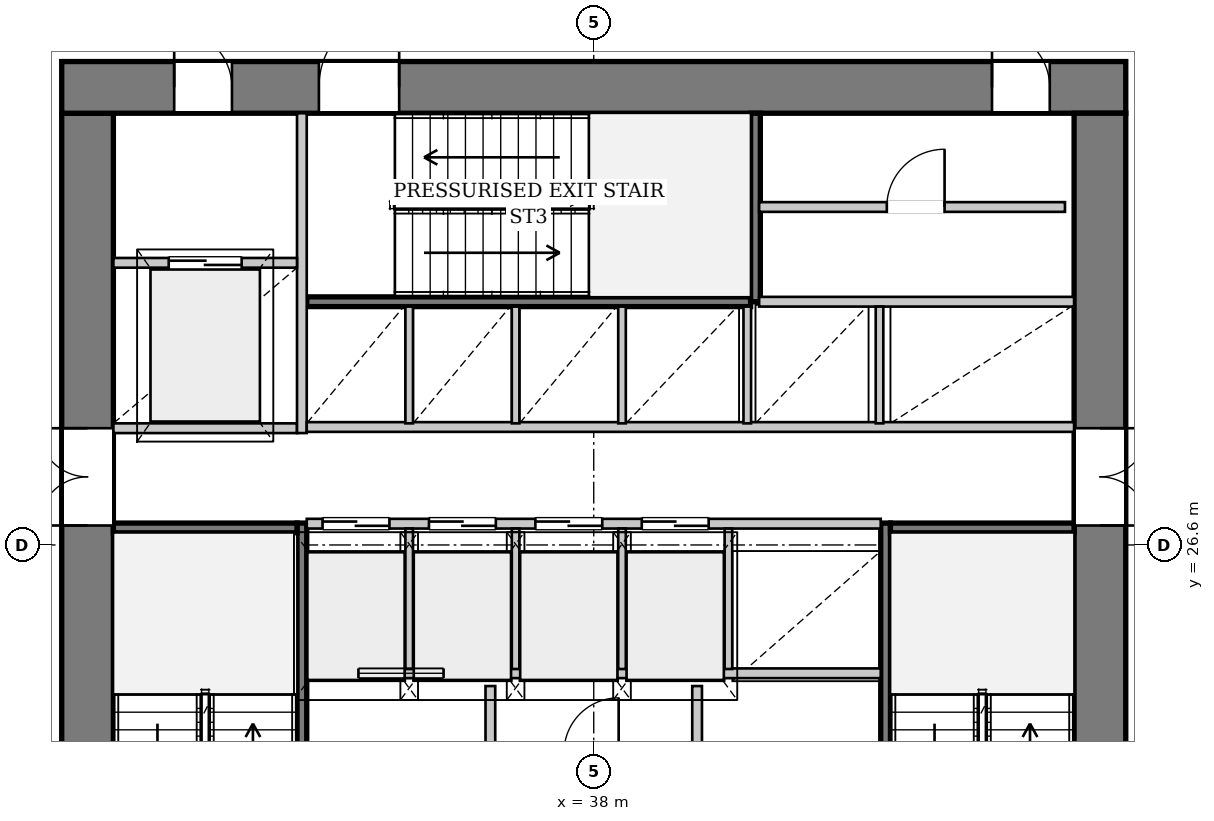
"""IFC4 building model, lengths in metres.
Left out: names, types, materials, properties, quantities, classifications, styles, units other than length and angle.
Written with IfcOpenShell. Run it as: python <this file> out.ifc"""

import sys

from ifc_helpers import new_model, si_unit, direction, frame, frame_2d, origin, place, context, subcontext, project, spatial, rectangle, extrude, source, transform, mapped, element, fill, save


model = new_model("IFC4")
c1 = context("Model", 3, precision=1e-05, world=origin(), true_north=direction((0.0, 1.0)))
c2 = subcontext(c1, "Body", "Model", "MODEL_VIEW")
j1 = project(units=[si_unit("LENGTHUNIT", "METRE"), si_unit("PLANEANGLEUNIT", "RADIAN")], contexts=[c1])
p1 = place(None, origin())
s1 = spatial("IfcSite", under=j1, at=p1, CompositionType="ELEMENT")
p2 = place(p1, origin())
s2 = spatial("IfcBuilding", under=s1, at=p2, CompositionType="ELEMENT")
p3 = place(p2, frame((0.0, 0.0, 71.9)))
s3 = spatial("IfcBuildingStorey", under=s2, at=p3, CompositionType="ELEMENT", Elevation=71.9)
p4 = place(p3, frame((46.163, 43.595, 0.0), z_axis=(0.0, 0.0, 1.0), x_axis=(0.906302989161, -0.422628550667, 0.0)))
e1 = element("IfcWall", 1, at=p4, inside=s3, PredefinedType="SOLIDWALL", context=c2, shape_type="SweptSolid", body=[
    extrude(rectangle(XDim=23.672, YDim=0.38, at=frame_2d((11.836, 0.0))), origin(), (0.0, 0.0, 1.0), 3.042),
])
p5 = place(p4, frame((5.528, 0.0, 0.65)))
e2 = element("IfcOpeningElement", 2, at=p5, cuts=e1, PredefinedType="OPENING", context=c2, shape_type="SweptSolid", body=[
    extrude(rectangle(XDim=2.2, YDim=2.25, at=frame_2d((1.1, 1.125))), frame((0.0, 0.2, 0.0), z_axis=(0.0, -1.0, 0.0), x_axis=(1.0, 0.0, 0.0)), (0.0, 0.0, 1.0), 0.4),
])
p6 = place(p4, frame((15.944, 0.0, 0.65)))
e3 = element("IfcOpeningElement", 3, at=p6, cuts=e1, PredefinedType="OPENING", context=c2, shape_type="SweptSolid", body=[
    extrude(rectangle(XDim=2.2, YDim=2.25, at=frame_2d((1.1, 1.125))), frame((0.0, 0.2, 0.0), z_axis=(0.0, -1.0, 0.0), x_axis=(1.0, 0.0, 0.0)), (0.0, 0.0, 1.0), 0.4),
])
p7 = place(p3, frame((29.675, 19.5, 0.0), z_axis=(0.0, 0.0, 1.0), x_axis=(0.0, 1.0, 0.0)))
e4 = element("IfcWall", 4, at=p7, inside=s3, PredefinedType="SHEAR", context=c2, shape_type="SweptSolid", body=[
    extrude(rectangle(XDim=14.2, YDim=0.85, at=frame_2d((7.1, 0.0))), origin(), (0.0, 0.0, 1.0), 3.75),
])
p8 = place(p7, frame((7.42, 0.0, 0.0)))
e5 = element("IfcOpeningElement", 5, at=p8, cuts=e4, PredefinedType="OPENING", context=c2, shape_type="SweptSolid", body=[
    extrude(rectangle(XDim=1.6, YDim=2.2, at=frame_2d((0.8, 1.1))), frame((0.0, 0.435, 0.0), z_axis=(0.0, -1.0, 0.0), x_axis=(1.0, 0.0, 0.0)), (0.0, 0.0, 1.0), 0.87),
])
p9 = place(p3, frame((29.25, 34.125, 0.0), z_axis=(0.0, 0.0, 1.0), x_axis=(1.0, 0.0, 0.0)))
e6 = element("IfcWall", 6, at=p9, inside=s3, PredefinedType="SHEAR", context=c2, shape_type="SweptSolid", body=[
    extrude(rectangle(XDim=17.5, YDim=0.85, at=frame_2d((8.75, 0.0))), origin(), (0.0, 0.0, 1.0), 3.75),
])
p10 = place(p9, frame((1.85, 0.0, 0.0)))
e7 = element("IfcOpeningElement", 7, at=p10, cuts=e6, PredefinedType="OPENING", context=c2, shape_type="SweptSolid", body=[
    extrude(rectangle(XDim=0.95, YDim=2.1, at=frame_2d((0.475, 1.05))), frame((0.0, 0.435, 0.0), z_axis=(0.0, -1.0, 0.0), x_axis=(1.0, 0.0, 0.0)), (0.0, 0.0, 1.0), 0.87),
])
p11 = place(p9, frame((4.23, 0.0, 0.0)))
e8 = element("IfcOpeningElement", 8, at=p11, cuts=e6, PredefinedType="OPENING", context=c2, shape_type="SweptSolid", body=[
    extrude(rectangle(XDim=1.32, YDim=2.2, at=frame_2d((0.66, 1.1))), frame((0.0, 0.435, 0.0), z_axis=(0.0, -1.0, 0.0), x_axis=(1.0, 0.0, 0.0)), (0.0, 0.0, 1.0), 0.87),
])
p12 = place(p9, frame((15.3, 0.0, 0.0)))
e9 = element("IfcOpeningElement", 9, at=p12, cuts=e6, PredefinedType="OPENING", context=c2, shape_type="SweptSolid", body=[
    extrude(rectangle(XDim=0.95, YDim=2.1, at=frame_2d((0.475, 1.05))), frame((0.0, 0.435, 0.0), z_axis=(0.0, -1.0, 0.0), x_axis=(1.0, 0.0, 0.0)), (0.0, 0.0, 1.0), 0.87),
])
p13 = place(p3, frame((46.325, 33.7, 0.0), z_axis=(0.0, 0.0, 1.0), x_axis=(0.0, -1.0, 0.0)))
e10 = element("IfcWall", 10, at=p13, inside=s3, PredefinedType="SHEAR", context=c2, shape_type="SweptSolid", body=[
    extrude(rectangle(XDim=14.2, YDim=0.85, at=frame_2d((7.1, 0.0))), origin(), (0.0, 0.0, 1.0), 3.75),
])
p14 = place(p13, frame((5.18, 0.0, 0.0)))
e11 = element("IfcOpeningElement", 11, at=p14, cuts=e10, PredefinedType="OPENING", context=c2, shape_type="SweptSolid", body=[
    extrude(rectangle(XDim=1.6, YDim=2.2, at=frame_2d((0.8, 1.1))), frame((0.0, 0.435, 0.0), z_axis=(0.0, -1.0, 0.0), x_axis=(1.0, 0.0, 0.0)), (0.0, 0.0, 1.0), 0.87),
])
p15 = place(p3, frame((33.2, 19.5, 0.0), z_axis=(0.0, 0.0, 1.0), x_axis=(0.0, 1.0, 0.0)))
e12 = element("IfcWall", 12, at=p15, inside=s3, PredefinedType="PARTITIONING", context=c2, shape_type="SweptSolid", body=[
    extrude(rectangle(XDim=7.46, YDim=0.16, at=frame_2d((3.73, 0.0))), origin(), (0.0, 0.0, 1.0), 3.75),
])
p16 = place(p15, frame((0.08, 0.0, 0.0)))
e13 = element("IfcOpeningElement", 13, at=p16, cuts=e12, PredefinedType="OPENING", context=c2, shape_type="SweptSolid", body=[
    extrude(rectangle(XDim=1.32, YDim=2.2, at=frame_2d((0.66, 1.1))), frame((0.0, 0.09, 0.0), z_axis=(0.0, -1.0, 0.0), x_axis=(1.0, 0.0, 0.0)), (0.0, 0.0, 1.0), 0.18),
])
p17 = place(p3, frame((30.1, 26.88, 0.0), z_axis=(0.0, 0.0, 1.0), x_axis=(1.0, 0.0, 0.0)))
e14 = element("IfcWall", 14, at=p17, inside=s3, PredefinedType="PARTITIONING", context=c2, shape_type="SweptSolid", body=[
    extrude(rectangle(XDim=3.02, YDim=0.16, at=frame_2d((1.51, 0.0))), origin(), (0.0, 0.0, 1.0), 3.75),
])
p18 = place(p3, frame((42.8, 26.96, 0.0), z_axis=(0.0, 0.0, 1.0), x_axis=(0.0, -1.0, 0.0)))
e15 = element("IfcWall", 15, at=p18, inside=s3, PredefinedType="PARTITIONING", context=c2, shape_type="SweptSolid", body=[
    extrude(rectangle(XDim=7.46, YDim=0.16, at=frame_2d((3.73, 0.0))), origin(), (0.0, 0.0, 1.0), 3.75),
])
p19 = place(p18, frame((6.06, 0.0, 0.0)))
e16 = element("IfcOpeningElement", 16, at=p19, cuts=e15, PredefinedType="OPENING", context=c2, shape_type="SweptSolid", body=[
    extrude(rectangle(XDim=1.32, YDim=2.2, at=frame_2d((0.66, 1.1))), frame((0.0, 0.09, 0.0), z_axis=(0.0, -1.0, 0.0), x_axis=(1.0, 0.0, 0.0)), (0.0, 0.0, 1.0), 0.18),
])
p20 = place(p3, frame((42.88, 26.88, 0.0), z_axis=(0.0, 0.0, 1.0), x_axis=(1.0, 0.0, 0.0)))
e17 = element("IfcWall", 17, at=p20, inside=s3, PredefinedType="PARTITIONING", context=c2, shape_type="SweptSolid", body=[
    extrude(rectangle(XDim=3.02, YDim=0.16, at=frame_2d((1.51, 0.0))), origin(), (0.0, 0.0, 1.0), 3.75),
])
p21 = place(p3, frame((33.28, 30.6, 0.0), z_axis=(0.0, 0.0, 1.0), x_axis=(1.0, 0.0, 0.0)))
e18 = element("IfcWall", 18, at=p21, inside=s3, PredefinedType="PARTITIONING", context=c2, shape_type="SweptSolid", body=[
    extrude(rectangle(XDim=7.3, YDim=0.16, at=frame_2d((3.65, 0.0))), origin(), (0.0, 0.0, 1.0), 3.75),
])
p22 = place(p3, frame((40.66, 30.6, 0.0), z_axis=(0.0, 0.0, 1.0), x_axis=(0.0, 1.0, 0.0)))
e19 = element("IfcWall", 19, at=p22, inside=s3, PredefinedType="PARTITIONING", context=c2, shape_type="SweptSolid", body=[
    extrude(rectangle(XDim=3.1, YDim=0.16, at=frame_2d((1.55, 0.0))), origin(), (0.0, 0.0, 1.0), 3.75),
])
p23 = place(p3, frame((36.3, 19.5, 0.0), z_axis=(0.0, 0.0, 1.0), x_axis=(0.0, 1.0, 0.0)))
e20 = element("IfcWall", 20, at=p23, inside=s3, PredefinedType="PARTITIONING", context=c2, shape_type="SweptSolid", body=[
    extrude(rectangle(XDim=4.78, YDim=0.16, at=frame_2d((2.39, 0.0))), origin(), (0.0, 0.0, 1.0), 3.75),
])
p24 = place(p23, frame((0.6, 0.0, 0.0)))
e21 = element("IfcOpeningElement", 21, at=p24, cuts=e20, PredefinedType="OPENING", context=c2, shape_type="SweptSolid", body=[
    extrude(rectangle(XDim=1.2, YDim=2.2, at=frame_2d((0.6, 1.1))), frame((0.0, 0.09, 0.0), z_axis=(0.0, -1.0, 0.0), x_axis=(1.0, 0.0, 0.0)), (0.0, 0.0, 1.0), 0.18),
])
p25 = place(p23, frame((2.65, 0.0, 0.0)))
e22 = element("IfcOpeningElement", 22, at=p25, cuts=e20, PredefinedType="OPENING", context=c2, shape_type="SweptSolid", body=[
    extrude(rectangle(XDim=0.95, YDim=2.1, at=frame_2d((0.475, 1.05))), frame((0.0, 0.09, 0.0), z_axis=(0.0, -1.0, 0.0), x_axis=(1.0, 0.0, 0.0)), (0.0, 0.0, 1.0), 0.18),
])
p26 = place(p3, frame((39.7, 24.28, 0.0), z_axis=(0.0, 0.0, 1.0), x_axis=(0.0, -1.0, 0.0)))
e23 = element("IfcWall", 23, at=p26, inside=s3, PredefinedType="PARTITIONING", context=c2, shape_type="SweptSolid", body=[
    extrude(rectangle(XDim=4.78, YDim=0.16, at=frame_2d((2.39, 0.0))), origin(), (0.0, 0.0, 1.0), 3.75),
])
p27 = place(p26, frame((3.12, 0.0, 0.0)))
e24 = element("IfcOpeningElement", 24, at=p27, cuts=e23, PredefinedType="OPENING", context=c2, shape_type="SweptSolid", body=[
    extrude(rectangle(XDim=1.2, YDim=2.2, at=frame_2d((0.6, 1.1))), frame((0.0, 0.09, 0.0), z_axis=(0.0, -1.0, 0.0), x_axis=(1.0, 0.0, 0.0)), (0.0, 0.0, 1.0), 0.18),
])
p28 = place(p3, frame((33.28, 24.49, 0.0), z_axis=(0.0, 0.0, 1.0), x_axis=(1.0, 0.0, 0.0)))
e25 = element("IfcWall", 25, at=p28, inside=s3, PredefinedType="PARTITIONING", context=c2, shape_type="SweptSolid", body=[
    extrude(rectangle(XDim=9.44, YDim=0.16, at=frame_2d((4.72, 0.0))), origin(), (0.0, 0.0, 1.0), 3.75),
])
p29 = place(p28, frame((0.85, 0.0, 0.95)))
e26 = element("IfcOpeningElement", 26, at=p29, cuts=e25, PredefinedType="OPENING", context=c2, shape_type="SweptSolid", body=[
    extrude(rectangle(XDim=1.4, YDim=1.8, at=frame_2d((0.7, 0.9))), frame((0.0, 0.09, 0.0), z_axis=(0.0, -1.0, 0.0), x_axis=(1.0, 0.0, 0.0)), (0.0, 0.0, 1.0), 0.18),
])
p30 = place(p3, frame((30.1, 28.52, 0.0), z_axis=(0.0, 0.0, 1.0), x_axis=(1.0, 0.0, 0.0)))
e27 = element("IfcWall", 27, at=p30, inside=s3, PredefinedType="PARTITIONING", context=c2, shape_type="SweptSolid", body=[
    extrude(rectangle(XDim=3.02, YDim=0.16, at=frame_2d((1.51, 0.0))), origin(), (0.0, 0.0, 1.0), 3.75),
])
p31 = place(p3, frame((33.2, 28.44, 0.0), z_axis=(0.0, 0.0, 1.0), x_axis=(0.0, 1.0, 0.0)))
e28 = element("IfcWall", 28, at=p31, inside=s3, PredefinedType="PARTITIONING", context=c2, shape_type="SweptSolid", body=[
    extrude(rectangle(XDim=5.26, YDim=0.16, at=frame_2d((2.63, 0.0))), origin(), (0.0, 0.0, 1.0), 3.75),
])
p32 = place(p3, frame((30.1, 31.24, 0.0), z_axis=(0.0, 0.0, 1.0), x_axis=(1.0, 0.0, 0.0)))
e29 = element("IfcWall", 29, at=p32, inside=s3, PredefinedType="PARTITIONING", context=c2, shape_type="SweptSolid", body=[
    extrude(rectangle(XDim=3.02, YDim=0.16, at=frame_2d((1.51, 0.0))), origin(), (0.0, 0.0, 1.0), 3.75),
])
p33 = place(p32, frame((0.91, 0.0, 0.0)))
e30 = element("IfcOpeningElement", 30, at=p33, cuts=e29, PredefinedType="OPENING", context=c2, shape_type="SweptSolid", body=[
    extrude(rectangle(XDim=1.2, YDim=2.2, at=frame_2d((0.6, 1.1))), frame((0.0, 0.09, 0.0), z_axis=(0.0, -1.0, 0.0), x_axis=(1.0, 0.0, 0.0)), (0.0, 0.0, 1.0), 0.18),
])
p34 = place(p3, frame((33.28, 26.95, 0.0), z_axis=(0.0, 0.0, 1.0), x_axis=(1.0, 0.0, 0.0)))
e31 = element("IfcWall", 31, at=p34, inside=s3, PredefinedType="PARTITIONING", context=c2, shape_type="SweptSolid", body=[
    extrude(rectangle(XDim=9.44, YDim=0.16, at=frame_2d((4.72, 0.0))), origin(), (0.0, 0.0, 1.0), 3.75),
])
p35 = place(p34, frame((0.26, 0.0, 0.0)))
e32 = element("IfcOpeningElement", 32, at=p35, cuts=e31, PredefinedType="OPENING", context=c2, shape_type="SweptSolid", body=[
    extrude(rectangle(XDim=1.1, YDim=2.2, at=frame_2d((0.55, 1.1))), frame((0.0, 0.09, 0.0), z_axis=(0.0, -1.0, 0.0), x_axis=(1.0, 0.0, 0.0)), (0.0, 0.0, 1.0), 0.18),
])
p36 = place(p34, frame((2.01, 0.0, 0.0)))
e33 = element("IfcOpeningElement", 33, at=p36, cuts=e31, PredefinedType="OPENING", context=c2, shape_type="SweptSolid", body=[
    extrude(rectangle(XDim=1.1, YDim=2.2, at=frame_2d((0.55, 1.1))), frame((0.0, 0.09, 0.0), z_axis=(0.0, -1.0, 0.0), x_axis=(1.0, 0.0, 0.0)), (0.0, 0.0, 1.0), 0.18),
])
p37 = place(p34, frame((3.76, 0.0, 0.0)))
e34 = element("IfcOpeningElement", 34, at=p37, cuts=e31, PredefinedType="OPENING", context=c2, shape_type="SweptSolid", body=[
    extrude(rectangle(XDim=1.1, YDim=2.2, at=frame_2d((0.55, 1.1))), frame((0.0, 0.09, 0.0), z_axis=(0.0, -1.0, 0.0), x_axis=(1.0, 0.0, 0.0)), (0.0, 0.0, 1.0), 0.18),
])
p38 = place(p34, frame((5.51, 0.0, 0.0)))
e35 = element("IfcOpeningElement", 35, at=p38, cuts=e31, PredefinedType="OPENING", context=c2, shape_type="SweptSolid", body=[
    extrude(rectangle(XDim=1.1, YDim=2.2, at=frame_2d((0.55, 1.1))), frame((0.0, 0.09, 0.0), z_axis=(0.0, -1.0, 0.0), x_axis=(1.0, 0.0, 0.0)), (0.0, 0.0, 1.0), 0.18),
])
for number, where, z_axis, x_axis in (
    (36, (34.965, 24.56, 0.0), (0.0, 0.0, 1.0), (0.0, 1.0, 0.0)),
    (37, (36.715, 24.56, 0.0), (0.0, 0.0, 1.0), (0.0, 1.0, 0.0)),
    (38, (38.465, 24.56, 0.0), (0.0, 0.0, 1.0), (0.0, 1.0, 0.0)),
    (39, (40.215, 24.56, 0.0), (0.0, 0.0, 1.0), (0.0, 1.0, 0.0)),
):
    element("IfcWall", number, at=place(p3, frame(where, z_axis=z_axis, x_axis=x_axis)), inside=s3, PredefinedType="PARTITIONING", context=c2, shape_type="SweptSolid", body=[
        extrude(rectangle(XDim=2.31, YDim=0.125, at=frame_2d((1.155, 0.0))), origin(), (0.0, 0.0, 1.0), 3.75),
    ])
p39 = place(p3, frame((33.28, 28.54, 0.0), z_axis=(0.0, 0.0, 1.0), x_axis=(1.0, 0.0, 0.0)))
e40 = element("IfcWall", 40, at=p39, inside=s3, PredefinedType="PARTITIONING", context=c2, shape_type="SweptSolid", body=[
    extrude(rectangle(XDim=12.62, YDim=0.16, at=frame_2d((6.31, 0.0))), origin(), (0.0, 0.0, 1.0), 3.75),
])
p40 = place(p3, frame((40.72, 30.6, 0.0), z_axis=(0.0, 0.0, 1.0), x_axis=(1.0, 0.0, 0.0)))
e41 = element("IfcWall", 41, at=p40, inside=s3, PredefinedType="PARTITIONING", context=c2, shape_type="SweptSolid", body=[
    extrude(rectangle(XDim=5.18, YDim=0.16, at=frame_2d((2.59, 0.0))), origin(), (0.0, 0.0, 1.0), 3.75),
])
for number, where, z_axis, x_axis in (
    (42, (34.965, 28.6, 0.0), (0.0, 0.0, 1.0), (0.0, 1.0, 0.0)),
    (43, (36.715, 28.6, 0.0), (0.0, 0.0, 1.0), (0.0, 1.0, 0.0)),
    (44, (38.465, 28.6, 0.0), (0.0, 0.0, 1.0), (0.0, 1.0, 0.0)),
    (45, (40.525, 28.6, 0.0), (0.0, 0.0, 1.0), (0.0, 1.0, 0.0)),
    (46, (42.7, 28.6, 0.0), (0.0, 0.0, 1.0), (0.0, 1.0, 0.0)),
):
    element("IfcWall", number, at=place(p3, frame(where, z_axis=z_axis, x_axis=x_axis)), inside=s3, PredefinedType="PARTITIONING", context=c2, shape_type="SweptSolid", body=[
        extrude(rectangle(XDim=1.92, YDim=0.125, at=frame_2d((0.96, 0.0))), origin(), (0.0, 0.0, 1.0), 3.75),
    ])
p41 = place(p3, frame((40.72, 32.158, 0.0), z_axis=(0.0, 0.0, 1.0), x_axis=(1.0, 0.0, 0.0)))
e47 = element("IfcWall", 47, at=p41, inside=s3, PredefinedType="PARTITIONING", context=c2, shape_type="SweptSolid", body=[
    extrude(rectangle(XDim=5.03, YDim=0.16, at=frame_2d((2.515, 0.0))), origin(), (0.0, 0.0, 1.0), 3.75),
])
p42 = place(p41, frame((2.1, 0.0, 0.0)))
e48 = element("IfcOpeningElement", 48, at=p42, cuts=e47, PredefinedType="OPENING", context=c2, shape_type="SweptSolid", body=[
    extrude(rectangle(XDim=0.95, YDim=2.1, at=frame_2d((0.475, 1.05))), frame((0.0, 0.09, 0.0), z_axis=(0.0, -1.0, 0.0), x_axis=(1.0, 0.0, 0.0)), (0.0, 0.0, 1.0), 0.18),
])
m1 = source(origin(), c2, "Body", "SweptSolid", [
    extrude(rectangle(XDim=1.6, YDim=2.2, at=frame_2d((0.8, 1.1))), frame((0.0, 0.025, 0.0), z_axis=(0.0, -1.0, 0.0), x_axis=(1.0, 0.0, 0.0)), (0.0, 0.0, 1.0), 0.05),
])
p43 = place(p8, origin())
e49 = element("IfcDoor", 49, at=p43, inside=s3, OperationType="DOUBLE_DOOR_SINGLE_SWING", PredefinedType="DOOR", context=c2, shape_type="MappedRepresentation", body=[
    mapped(m1, transform((0.0, 0.0, 0.0), x_axis=(1.0, 0.0, 0.0), y_axis=(0.0, 1.0, 0.0), z_axis=(0.0, 0.0, 1.0), scale=1.0)),
])
fill(e5, e49)
m2 = source(origin(), c2, "Body", "SweptSolid", [
    extrude(rectangle(XDim=0.95, YDim=2.1, at=frame_2d((0.475, 1.05))), frame((0.0, 0.025, 0.0), z_axis=(0.0, -1.0, 0.0), x_axis=(1.0, 0.0, 0.0)), (0.0, 0.0, 1.0), 0.05),
])
p44 = place(p10, origin())
e50 = element("IfcDoor", 50, at=p44, inside=s3, OperationType="SINGLE_SWING_LEFT", PredefinedType="DOOR", context=c2, shape_type="MappedRepresentation", body=[
    mapped(m2, transform((0.0, 0.0, 0.0), x_axis=(1.0, 0.0, 0.0), y_axis=(0.0, 1.0, 0.0), z_axis=(0.0, 0.0, 1.0), scale=1.0)),
])
fill(e7, e50)
m3 = source(origin(), c2, "Body", "SweptSolid", [
    extrude(rectangle(XDim=1.32, YDim=2.2, at=frame_2d((0.66, 1.1))), frame((0.0, 0.025, 0.0), z_axis=(0.0, -1.0, 0.0), x_axis=(1.0, 0.0, 0.0)), (0.0, 0.0, 1.0), 0.05),
])
p45 = place(p11, origin())
e51 = element("IfcDoor", 51, at=p45, inside=s3, OperationType="SINGLE_SWING_RIGHT", PredefinedType="DOOR", context=c2, shape_type="MappedRepresentation", body=[
    mapped(m3, transform((0.0, 0.0, 0.0), x_axis=(1.0, 0.0, 0.0), y_axis=(0.0, 1.0, 0.0), z_axis=(0.0, 0.0, 1.0), scale=1.0)),
])
fill(e8, e51)
p46 = place(p14, origin())
e52 = element("IfcDoor", 52, at=p46, inside=s3, OperationType="DOUBLE_DOOR_SINGLE_SWING", PredefinedType="DOOR", context=c2, shape_type="MappedRepresentation", body=[
    mapped(m1, transform((0.0, 0.0, 0.0), x_axis=(1.0, 0.0, 0.0), y_axis=(0.0, 1.0, 0.0), z_axis=(0.0, 0.0, 1.0), scale=1.0)),
])
fill(e11, e52)
m4 = source(origin(), c2, "Body", "SweptSolid", [
    extrude(rectangle(XDim=1.2, YDim=2.2, at=frame_2d((0.6, 1.1))), frame((0.0, 0.025, 0.0), z_axis=(0.0, -1.0, 0.0), x_axis=(1.0, 0.0, 0.0)), (0.0, 0.0, 1.0), 0.05),
])
p47 = place(p33, origin())
e53 = element("IfcDoor", 53, at=p47, inside=s3, OperationType="DOUBLE_DOOR_SLIDING", PredefinedType="DOOR", context=c2, shape_type="MappedRepresentation", body=[
    mapped(m4, transform((0.0, 0.0, 0.0), x_axis=(1.0, 0.0, 0.0), y_axis=(0.0, 1.0, 0.0), z_axis=(0.0, 0.0, 1.0), scale=1.0)),
])
fill(e30, e53)
m5 = source(origin(), c2, "Body", "SweptSolid", [
    extrude(rectangle(XDim=1.1, YDim=2.2, at=frame_2d((0.55, 1.1))), frame((0.0, 0.025, 0.0), z_axis=(0.0, -1.0, 0.0), x_axis=(1.0, 0.0, 0.0)), (0.0, 0.0, 1.0), 0.05),
])
p48 = place(p35, origin())
e54 = element("IfcDoor", 54, at=p48, inside=s3, OperationType="DOUBLE_DOOR_SLIDING", PredefinedType="DOOR", context=c2, shape_type="MappedRepresentation", body=[
    mapped(m5, transform((0.0, 0.0, 0.0), x_axis=(1.0, 0.0, 0.0), y_axis=(0.0, 1.0, 0.0), z_axis=(0.0, 0.0, 1.0), scale=1.0)),
])
fill(e32, e54)
p49 = place(p36, origin())
e55 = element("IfcDoor", 55, at=p49, inside=s3, OperationType="DOUBLE_DOOR_SLIDING", PredefinedType="DOOR", context=c2, shape_type="MappedRepresentation", body=[
    mapped(m5, transform((0.0, 0.0, 0.0), x_axis=(1.0, 0.0, 0.0), y_axis=(0.0, 1.0, 0.0), z_axis=(0.0, 0.0, 1.0), scale=1.0)),
])
fill(e33, e55)
p50 = place(p37, origin())
e56 = element("IfcDoor", 56, at=p50, inside=s3, OperationType="DOUBLE_DOOR_SLIDING", PredefinedType="DOOR", context=c2, shape_type="MappedRepresentation", body=[
    mapped(m5, transform((0.0, 0.0, 0.0), x_axis=(1.0, 0.0, 0.0), y_axis=(0.0, 1.0, 0.0), z_axis=(0.0, 0.0, 1.0), scale=1.0)),
])
fill(e34, e56)
p51 = place(p38, origin())
e57 = element("IfcDoor", 57, at=p51, inside=s3, OperationType="DOUBLE_DOOR_SLIDING", PredefinedType="DOOR", context=c2, shape_type="MappedRepresentation", body=[
    mapped(m5, transform((0.0, 0.0, 0.0), x_axis=(1.0, 0.0, 0.0), y_axis=(0.0, 1.0, 0.0), z_axis=(0.0, 0.0, 1.0), scale=1.0)),
])
fill(e35, e57)
p52 = place(p42, origin())
e58 = element("IfcDoor", 58, at=p52, inside=s3, OperationType="SINGLE_SWING_RIGHT", PredefinedType="DOOR", context=c2, shape_type="MappedRepresentation", body=[
    mapped(m2, transform((0.0, 0.0, 0.0), x_axis=(1.0, 0.0, 0.0), y_axis=(0.0, 1.0, 0.0), z_axis=(0.0, 0.0, 1.0), scale=1.0)),
])
fill(e48, e58)
p53 = place(p12, origin())
e59 = element("IfcDoor", 59, at=p53, inside=s3, OperationType="SINGLE_SWING_LEFT", PredefinedType="DOOR", context=c2, shape_type="MappedRepresentation", body=[
    mapped(m2, transform((0.0, 0.0, 0.0), x_axis=(1.0, 0.0, 0.0), y_axis=(0.0, 1.0, 0.0), z_axis=(0.0, 0.0, 1.0), scale=1.0)),
])
fill(e9, e59)
m6 = source(origin(), c2, "Body", "SweptSolid", [
    extrude(rectangle(XDim=1.4, YDim=1.8, at=frame_2d((0.7, 0.9))), frame((0.0, 0.03, 0.0), z_axis=(0.0, -1.0, 0.0), x_axis=(1.0, 0.0, 0.0)), (0.0, 0.0, 1.0), 0.06),
])
p54 = place(p29, origin())
e60 = element("IfcWindow", 60, at=p54, inside=s3, PartitioningType="SINGLE_PANEL", PredefinedType="WINDOW", context=c2, shape_type="MappedRepresentation", body=[
    mapped(m6, transform((0.0, 0.0, 0.0), x_axis=(1.0, 0.0, 0.0), y_axis=(0.0, 1.0, 0.0), z_axis=(0.0, 0.0, 1.0), scale=1.0)),
])
fill(e26, e60)
save(model, sys.argv[1])
